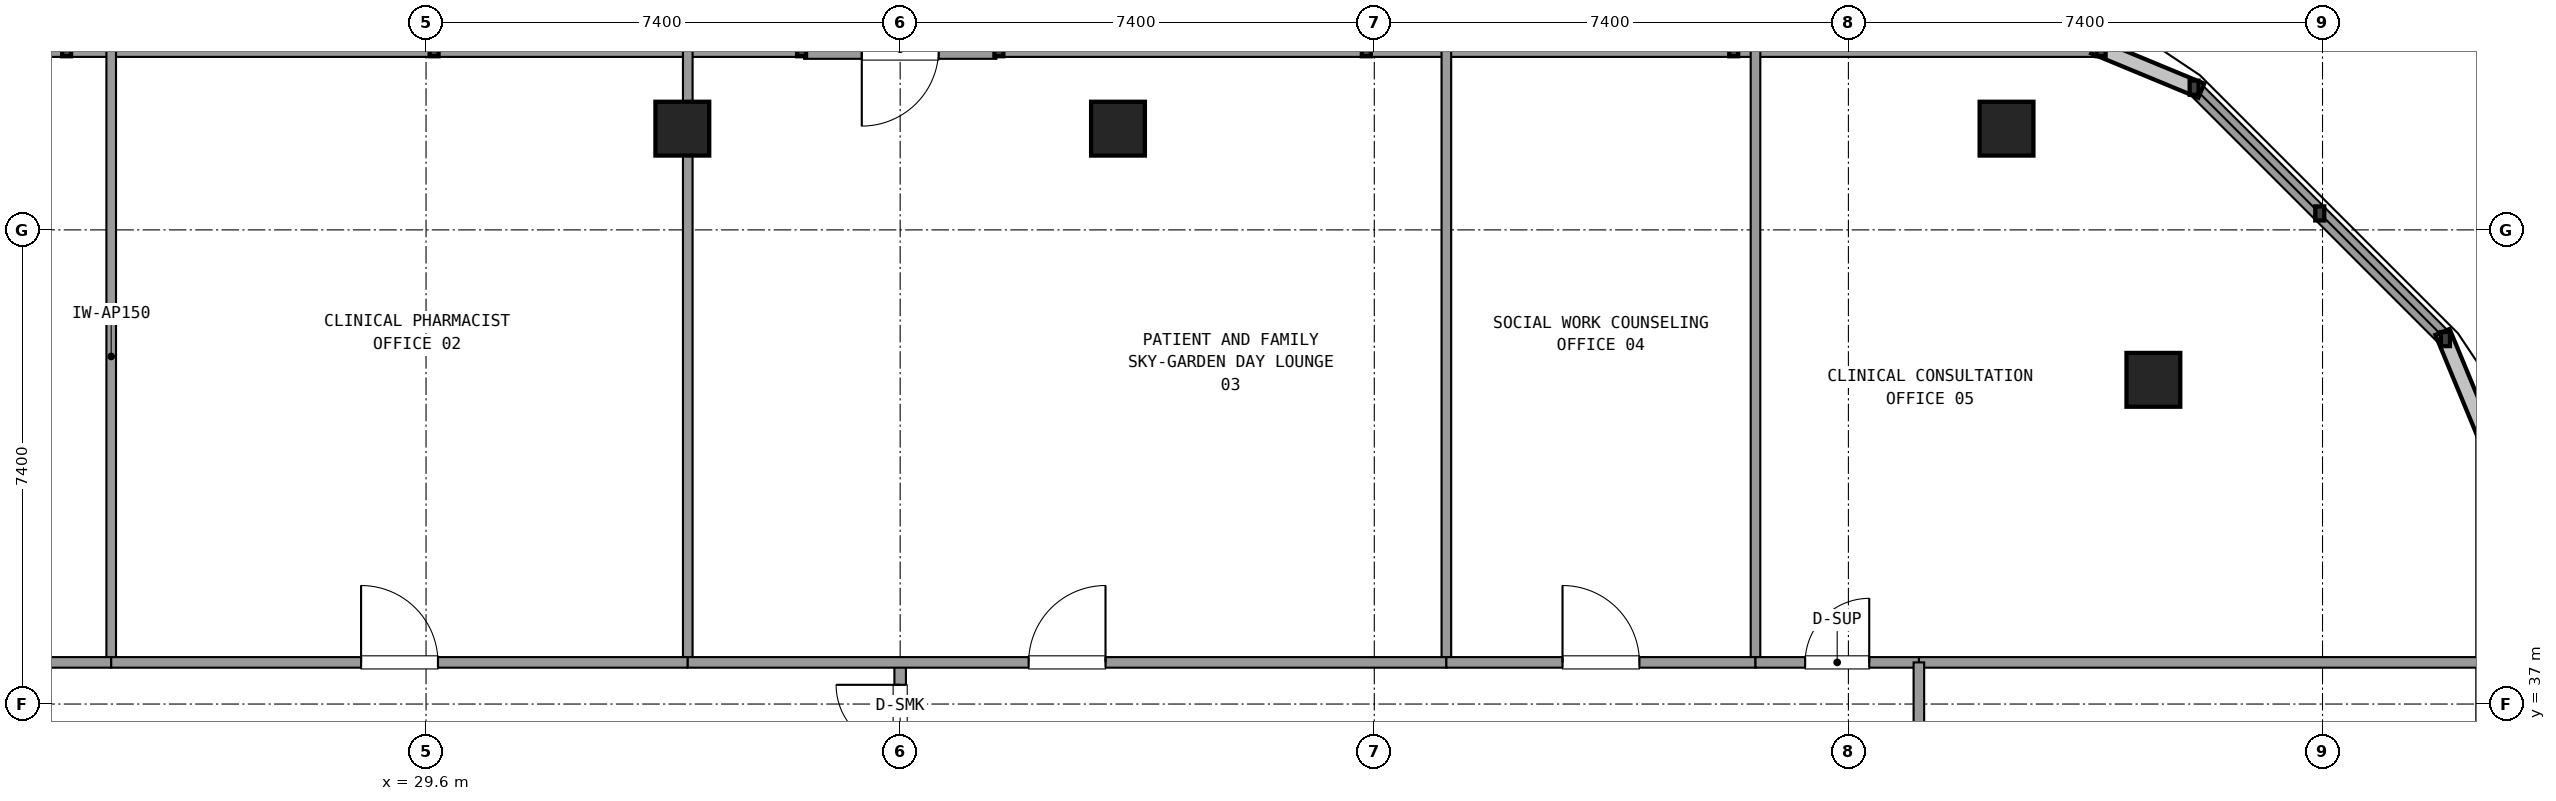
"""IFC4 building model, lengths in metres.
Left out: names, types, materials, properties, quantities, classifications, styles, units other than length and angle.
Written with IfcOpenShell. Run it as: python <this file> out.ifc"""

import sys

from ifc_helpers import new_model, si_unit, direction, frame, frame_2d, origin, origin_2d, place, context, subcontext, project, spatial, rectangle, extrude, element, fill, save


model = new_model("IFC4")
c1 = context("Model", 3, precision=1e-05, world=origin(), true_north=direction((0.0, 1.0)))
c2 = subcontext(c1, "Body", "Model", "MODEL_VIEW")
j1 = project(units=[si_unit("LENGTHUNIT", "METRE"), si_unit("PLANEANGLEUNIT", "RADIAN")], contexts=[c1])
p1 = place(None, origin())
s1 = spatial("IfcSite", under=j1, at=p1, CompositionType="ELEMENT")
p2 = place(p1, origin())
s2 = spatial("IfcBuilding", under=s1, at=p2, CompositionType="ELEMENT")
p3 = place(p2, frame((0.0, 0.0, 246.42)))
s3 = spatial("IfcBuildingStorey", under=s2, at=p3, CompositionType="ELEMENT", Elevation=246.42)
for number, where, z_axis, x_axis in (
    (1, (56.56, 42.06, 0.0), (0.0, 0.0, 1.0), (1.0, 0.0, 0.0)),
    (2, (54.268, 45.98, 0.0), (0.0, 0.0, 1.0), (1.0, 0.0, 0.0)),
    (3, (40.4, 45.98, 0.0), (0.0, 0.0, 1.0), (1.0, 0.0, 0.0)),
    (4, (33.6, 45.98, 0.0), (0.0, 0.0, 1.0), (1.0, 0.0, 0.0)),
):
    element("IfcColumn", number, at=place(p3, frame(where, z_axis=z_axis, x_axis=x_axis)), inside=s3, PredefinedType="COLUMN", context=c2, shape_type="SweptSolid", body=[
        extrude(rectangle(XDim=0.84, YDim=0.84, at=origin_2d()), origin(), (0.0, 0.0, 1.0), 3.6),
    ])
p4 = place(p3, frame((61.72, 27.44, 0.0), z_axis=(0.0, 0.0, 1.0), x_axis=(0.0, 1.0, 0.0)))
e5 = element("IfcWall", 5, at=p4, inside=s3, PredefinedType="SOLIDWALL", context=c2, shape_type="SweptSolid", body=[
    extrude(rectangle(XDim=13.805, YDim=0.24, at=frame_2d((6.903, 0.0))), origin(), (0.0, 0.0, 1.0), 0.85),
])
p5 = place(p3, frame((61.119, 42.696, 0.0), z_axis=(0.0, 0.0, 1.0), x_axis=(-0.707106781187, 0.707106781187, 0.0)))
e6 = element("IfcWall", 6, at=p5, inside=s3, PredefinedType="SOLIDWALL", context=c2, shape_type="SweptSolid", body=[
    extrude(rectangle(XDim=5.548, YDim=0.24, at=frame_2d((2.774, 0.0))), origin(), (0.0, 0.0, 1.0), 0.85),
])
p6 = place(p3, frame((38.501, 47.22, 0.0), z_axis=(0.0, 0.0, 1.0), x_axis=(-1.0, 0.0, 0.0)))
e7 = element("IfcWall", 7, at=p6, inside=s3, PredefinedType="SOLIDWALL", context=c2, shape_type="SweptSolid", body=[
    extrude(rectangle(XDim=3.0, YDim=0.3, at=frame_2d((1.5, 0.0))), origin(), (0.0, 0.0, 1.0), 2.69),
])
p7 = place(p6, frame((0.9, 0.0, 0.0)))
e8 = element("IfcOpeningElement", 8, at=p7, cuts=e7, PredefinedType="OPENING", context=c2, shape_type="SweptSolid", body=[
    extrude(rectangle(XDim=1.2, YDim=2.2, at=frame_2d((0.6, 1.1))), frame((0.0, 0.16, 0.0), z_axis=(0.0, -1.0, 0.0), x_axis=(1.0, 0.0, 0.0)), (0.0, 0.0, 1.0), 0.32),
])
p8 = place(p3, frame((55.745, 47.22, 0.0), z_axis=(0.0, 0.0, 1.0), x_axis=(-1.0, 0.0, 0.0)))
e9 = element("IfcWall", 9, at=p8, inside=s3, PredefinedType="SOLIDWALL", context=c2, shape_type="SweptSolid", body=[
    extrude(rectangle(XDim=17.204, YDim=0.24, at=frame_2d((8.602, 0.0))), origin(), (0.0, 0.0, 1.0), 0.85),
])
p9 = place(p3, frame((35.461, 47.22, 0.0), z_axis=(0.0, 0.0, 1.0), x_axis=(-1.0, 0.0, 0.0)))
e10 = element("IfcWall", 10, at=p9, inside=s3, PredefinedType="SOLIDWALL", context=c2, shape_type="SweptSolid", body=[
    extrude(rectangle(XDim=17.206, YDim=0.24, at=frame_2d((8.603, 0.0))), origin(), (0.0, 0.0, 1.0), 0.85),
])
p10 = place(p3, frame((37.0, 34.95, 0.0), z_axis=(0.0, 0.0, 1.0), x_axis=(0.0, 1.0, 0.0)))
e11 = element("IfcWall", 11, at=p10, inside=s3, PredefinedType="PARTITIONING", context=c2, shape_type="SweptSolid", body=[
    extrude(rectangle(XDim=2.7, YDim=0.18, at=frame_2d((1.35, 0.0))), origin(), (0.0, 0.0, 1.0), 2.61),
])
p11 = place(p10, frame((0.35, 0.0, 0.0)))
e12 = element("IfcOpeningElement", 12, at=p11, cuts=e11, PredefinedType="OPENING", context=c2, shape_type="SweptSolid", body=[
    extrude(rectangle(XDim=2.0, YDim=2.2, at=frame_2d((1.0, 1.1))), frame((0.0, 0.1, 0.0), z_axis=(0.0, -1.0, 0.0), x_axis=(1.0, 0.0, 0.0)), (0.0, 0.0, 1.0), 0.2),
])
p12 = place(p3, frame((52.9, 37.65, 0.0), z_axis=(0.0, 0.0, 1.0), x_axis=(1.0, 0.0, 0.0)))
e13 = element("IfcWall", 13, at=p12, inside=s3, PredefinedType="PARTITIONING", context=c2, shape_type="SweptSolid", body=[
    extrude(rectangle(XDim=8.8, YDim=0.165, at=frame_2d((4.4, 0.0))), origin(), (0.0, 0.0, 1.0), 2.61),
])
p13 = place(p3, frame((24.686, 37.65, 0.0), z_axis=(0.0, 0.0, 1.0), x_axis=(0.0, 1.0, 0.0)))
e14 = element("IfcWall", 14, at=p13, inside=s3, PredefinedType="PARTITIONING", context=c2, shape_type="SweptSolid", body=[
    extrude(rectangle(XDim=9.55, YDim=0.15, at=frame_2d((4.775, 0.0))), origin(), (0.0, 0.0, 1.0), 2.61),
])
p14 = place(p3, frame((21.1, 37.65, 0.0), z_axis=(0.0, 0.0, 1.0), x_axis=(1.0, 0.0, 0.0)))
e15 = element("IfcWall", 15, at=p14, inside=s3, PredefinedType="PARTITIONING", context=c2, shape_type="SweptSolid", body=[
    extrude(rectangle(XDim=3.586, YDim=0.165, at=frame_2d((1.793, 0.0))), origin(), (0.0, 0.0, 1.0), 2.61),
])
p15 = place(p14, frame((1.193, 0.0, 0.0)))
e16 = element("IfcOpeningElement", 16, at=p15, cuts=e15, PredefinedType="OPENING", context=c2, shape_type="SweptSolid", body=[
    extrude(rectangle(XDim=1.2, YDim=2.15, at=frame_2d((0.6, 1.075))), frame((0.0, 0.093, 0.0), z_axis=(0.0, -1.0, 0.0), x_axis=(1.0, 0.0, 0.0)), (0.0, 0.0, 1.0), 0.185),
])
p16 = place(p3, frame((33.685, 37.65, 0.0), z_axis=(0.0, 0.0, 1.0), x_axis=(0.0, 1.0, 0.0)))
e17 = element("IfcWall", 17, at=p16, inside=s3, PredefinedType="PARTITIONING", context=c2, shape_type="SweptSolid", body=[
    extrude(rectangle(XDim=9.55, YDim=0.15, at=frame_2d((4.775, 0.0))), origin(), (0.0, 0.0, 1.0), 2.61),
])
p17 = place(p3, frame((24.686, 37.65, 0.0), z_axis=(0.0, 0.0, 1.0), x_axis=(1.0, 0.0, 0.0)))
e18 = element("IfcWall", 18, at=p17, inside=s3, PredefinedType="PARTITIONING", context=c2, shape_type="SweptSolid", body=[
    extrude(rectangle(XDim=8.999, YDim=0.165, at=frame_2d((4.5, 0.0))), origin(), (0.0, 0.0, 1.0), 2.61),
])
p18 = place(p17, frame((3.9, 0.0, 0.0)))
e19 = element("IfcOpeningElement", 19, at=p18, cuts=e18, PredefinedType="OPENING", context=c2, shape_type="SweptSolid", body=[
    extrude(rectangle(XDim=1.2, YDim=2.15, at=frame_2d((0.6, 1.075))), frame((0.0, 0.093, 0.0), z_axis=(0.0, -1.0, 0.0), x_axis=(1.0, 0.0, 0.0)), (0.0, 0.0, 1.0), 0.185),
])
p19 = place(p3, frame((45.525, 37.65, 0.0), z_axis=(0.0, 0.0, 1.0), x_axis=(0.0, 1.0, 0.0)))
e20 = element("IfcWall", 20, at=p19, inside=s3, PredefinedType="PARTITIONING", context=c2, shape_type="SweptSolid", body=[
    extrude(rectangle(XDim=9.55, YDim=0.15, at=frame_2d((4.775, 0.0))), origin(), (0.0, 0.0, 1.0), 2.61),
])
p20 = place(p3, frame((33.685, 37.65, 0.0), z_axis=(0.0, 0.0, 1.0), x_axis=(1.0, 0.0, 0.0)))
e21 = element("IfcWall", 21, at=p20, inside=s3, PredefinedType="PARTITIONING", context=c2, shape_type="SweptSolid", body=[
    extrude(rectangle(XDim=11.84, YDim=0.165, at=frame_2d((5.92, 0.0))), origin(), (0.0, 0.0, 1.0), 2.61),
])
p21 = place(p20, frame((5.32, 0.0, 0.0)))
e22 = element("IfcOpeningElement", 22, at=p21, cuts=e21, PredefinedType="OPENING", context=c2, shape_type="SweptSolid", body=[
    extrude(rectangle(XDim=1.2, YDim=2.15, at=frame_2d((0.6, 1.075))), frame((0.0, 0.093, 0.0), z_axis=(0.0, -1.0, 0.0), x_axis=(1.0, 0.0, 0.0)), (0.0, 0.0, 1.0), 0.185),
])
p22 = place(p3, frame((50.35, 37.65, 0.0), z_axis=(0.0, 0.0, 1.0), x_axis=(0.0, 1.0, 0.0)))
e23 = element("IfcWall", 23, at=p22, inside=s3, PredefinedType="PARTITIONING", context=c2, shape_type="SweptSolid", body=[
    extrude(rectangle(XDim=9.55, YDim=0.15, at=frame_2d((4.775, 0.0))), origin(), (0.0, 0.0, 1.0), 2.61),
])
p23 = place(p3, frame((45.525, 37.65, 0.0), z_axis=(0.0, 0.0, 1.0), x_axis=(1.0, 0.0, 0.0)))
e24 = element("IfcWall", 24, at=p23, inside=s3, PredefinedType="PARTITIONING", context=c2, shape_type="SweptSolid", body=[
    extrude(rectangle(XDim=4.825, YDim=0.165, at=frame_2d((2.413, 0.0))), origin(), (0.0, 0.0, 1.0), 2.61),
])
p24 = place(p23, frame((1.813, 0.0, 0.0)))
e25 = element("IfcOpeningElement", 25, at=p24, cuts=e24, PredefinedType="OPENING", context=c2, shape_type="SweptSolid", body=[
    extrude(rectangle(XDim=1.2, YDim=2.15, at=frame_2d((0.6, 1.075))), frame((0.0, 0.093, 0.0), z_axis=(0.0, -1.0, 0.0), x_axis=(1.0, 0.0, 0.0)), (0.0, 0.0, 1.0), 0.185),
])
p25 = place(p3, frame((50.35, 37.65, 0.0), z_axis=(0.0, 0.0, 1.0), x_axis=(1.0, 0.0, 0.0)))
e26 = element("IfcWall", 26, at=p25, inside=s3, PredefinedType="PARTITIONING", context=c2, shape_type="SweptSolid", body=[
    extrude(rectangle(XDim=2.55, YDim=0.165, at=frame_2d((1.275, 0.0))), origin(), (0.0, 0.0, 1.0), 2.61),
])
p26 = place(p25, frame((0.775, 0.0, 0.0)))
e27 = element("IfcOpeningElement", 27, at=p26, cuts=e26, PredefinedType="OPENING", context=c2, shape_type="SweptSolid", body=[
    extrude(rectangle(XDim=1.0, YDim=2.15, at=frame_2d((0.5, 1.075))), frame((0.0, 0.093, 0.0), z_axis=(0.0, -1.0, 0.0), x_axis=(1.0, 0.0, 0.0)), (0.0, 0.0, 1.0), 0.185),
])
p27 = place(p3, frame((52.9, 24.02, 0.0), z_axis=(0.0, 0.0, 1.0), x_axis=(0.0, 1.0, 0.0)))
e28 = element("IfcWall", 28, at=p27, inside=s3, PredefinedType="PARTITIONING", context=c2, shape_type="SweptSolid", body=[
    extrude(rectangle(XDim=13.63, YDim=0.165, at=frame_2d((6.815, 0.0))), origin(), (0.0, 0.0, 1.0), 2.61),
])
p28 = place(p27, frame((6.215, 0.0, 0.0)))
e29 = element("IfcOpeningElement", 29, at=p28, cuts=e28, PredefinedType="OPENING", context=c2, shape_type="SweptSolid", body=[
    extrude(rectangle(XDim=1.2, YDim=2.15, at=frame_2d((0.6, 1.075))), frame((0.0, 0.093, 0.0), z_axis=(0.0, -1.0, 0.0), x_axis=(1.0, 0.0, 0.0)), (0.0, 0.0, 1.0), 0.185),
])
p29 = place(p11, origin())
e30 = element("IfcDoor", 30, at=p29, inside=s3, OperationType="DOUBLE_DOOR_SINGLE_SWING", PredefinedType="DOOR", context=c2, shape_type="SweptSolid", body=[
    extrude(rectangle(XDim=2.0, YDim=2.2, at=frame_2d((1.0, 1.1))), frame((0.0, 0.025, 0.0), z_axis=(0.0, -1.0, 0.0), x_axis=(1.0, 0.0, 0.0)), (0.0, 0.0, 1.0), 0.05),
])
fill(e12, e30)
p30 = place(p18, origin())
e31 = element("IfcDoor", 31, at=p30, inside=s3, OperationType="SINGLE_SWING_LEFT", PredefinedType="DOOR", context=c2, shape_type="SweptSolid", body=[
    extrude(rectangle(XDim=1.2, YDim=2.15, at=frame_2d((0.6, 1.075))), frame((0.0, 0.025, 0.0), z_axis=(0.0, -1.0, 0.0), x_axis=(1.0, 0.0, 0.0)), (0.0, 0.0, 1.0), 0.05),
])
fill(e19, e31)
p31 = place(p21, origin())
e32 = element("IfcDoor", 32, at=p31, inside=s3, OperationType="SINGLE_SWING_RIGHT", PredefinedType="DOOR", context=c2, shape_type="SweptSolid", body=[
    extrude(rectangle(XDim=1.2, YDim=2.15, at=frame_2d((0.6, 1.075))), frame((0.0, 0.025, 0.0), z_axis=(0.0, -1.0, 0.0), x_axis=(1.0, 0.0, 0.0)), (0.0, 0.0, 1.0), 0.05),
])
fill(e22, e32)
p32 = place(p24, origin())
e33 = element("IfcDoor", 33, at=p32, inside=s3, OperationType="SINGLE_SWING_LEFT", PredefinedType="DOOR", context=c2, shape_type="SweptSolid", body=[
    extrude(rectangle(XDim=1.2, YDim=2.15, at=frame_2d((0.6, 1.075))), frame((0.0, 0.025, 0.0), z_axis=(0.0, -1.0, 0.0), x_axis=(1.0, 0.0, 0.0)), (0.0, 0.0, 1.0), 0.05),
])
fill(e25, e33)
p33 = place(p26, origin())
e34 = element("IfcDoor", 34, at=p33, inside=s3, OperationType="SINGLE_SWING_RIGHT", PredefinedType="DOOR", context=c2, shape_type="SweptSolid", body=[
    extrude(rectangle(XDim=1.0, YDim=2.15, at=frame_2d((0.5, 1.075))), frame((0.0, 0.025, 0.0), z_axis=(0.0, -1.0, 0.0), x_axis=(1.0, 0.0, 0.0)), (0.0, 0.0, 1.0), 0.05),
])
fill(e27, e34)
save(model, sys.argv[1])
